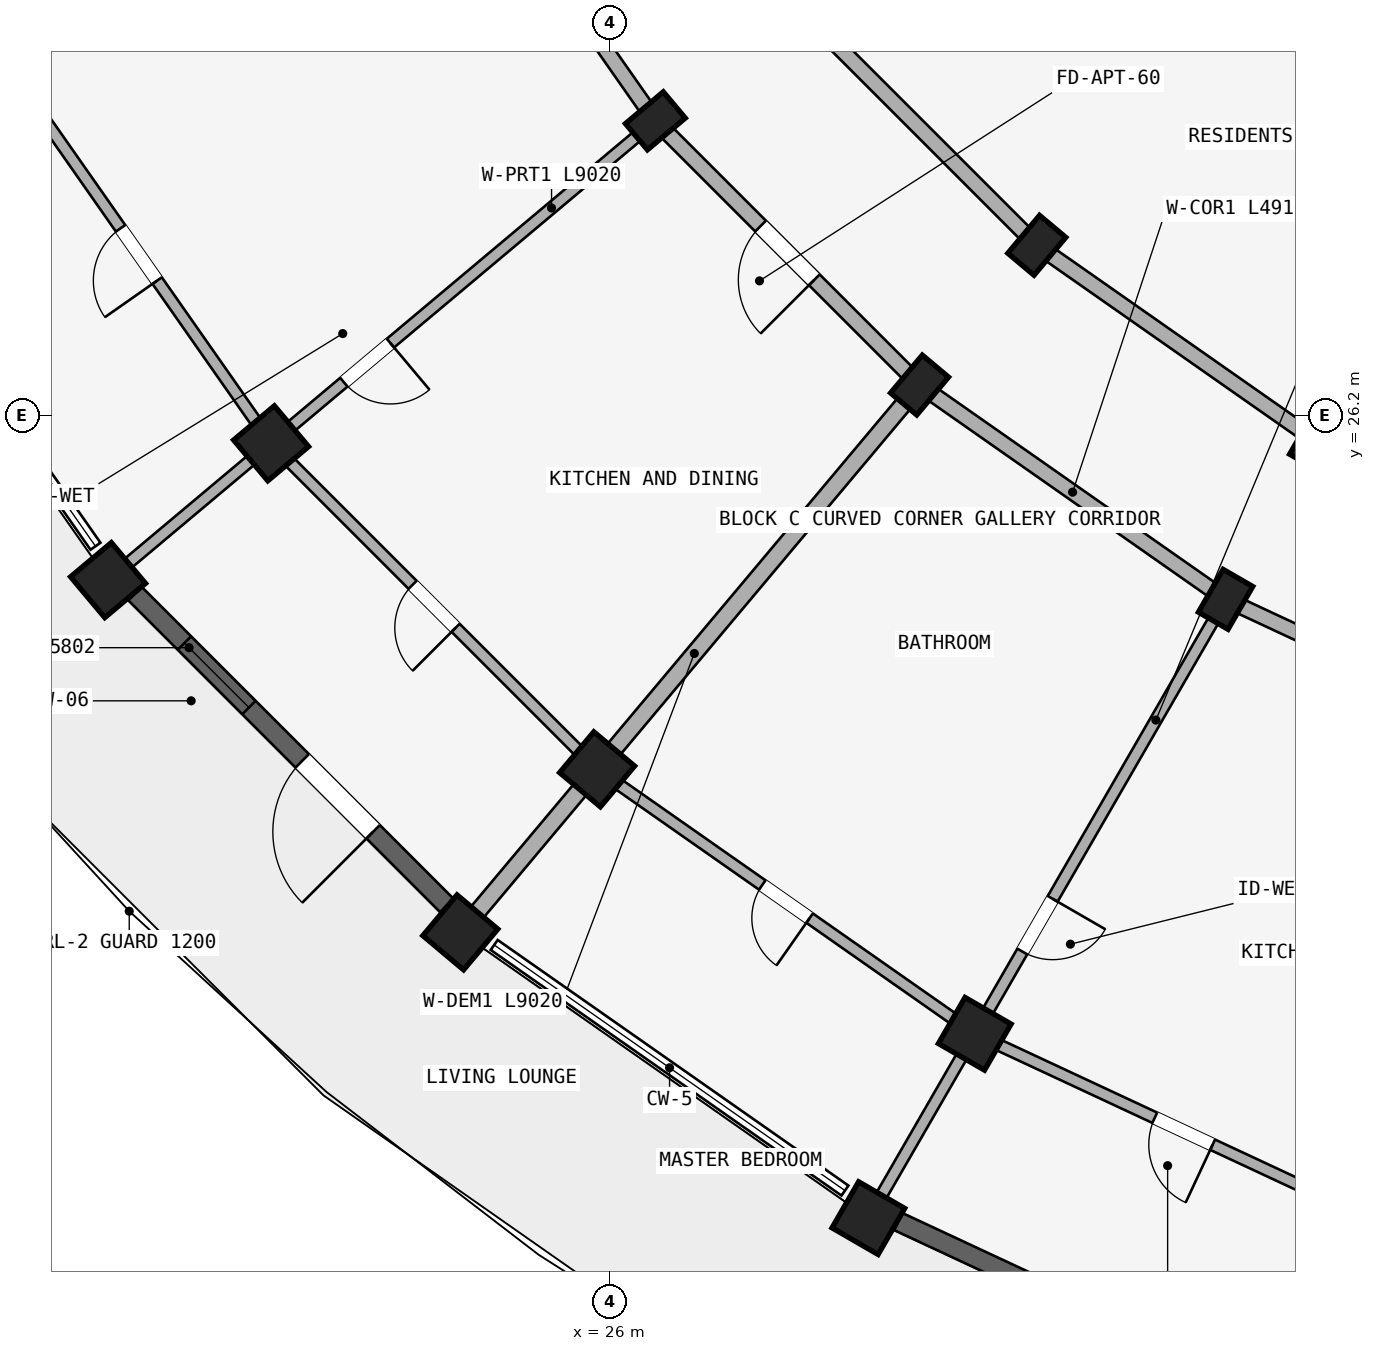
"""IFC4 building model, lengths in metres.
Left out: names, types, materials, properties, quantities, classifications, styles, units other than length and angle.
Written with IfcOpenShell. Run it as: python <this file> out.ifc"""

import sys

from ifc_helpers import new_model, si_unit, direction, frame, frame_2d, origin, origin_2d, place, context, subcontext, project, spatial, rectangle, extrude, element, fill, save


model = new_model("IFC4")
c1 = context("Model", 3, precision=1e-05, world=origin(), true_north=direction((0.0, 1.0)))
c2 = subcontext(c1, "Body", "Model", "MODEL_VIEW")
j1 = project(units=[si_unit("LENGTHUNIT", "METRE"), si_unit("PLANEANGLEUNIT", "RADIAN")], contexts=[c1])
p1 = place(None, origin())
s1 = spatial("IfcSite", under=j1, at=p1, CompositionType="ELEMENT")
p2 = place(p1, origin())
s2 = spatial("IfcBuilding", under=s1, at=p2, CompositionType="ELEMENT")
p3 = place(p2, frame((0.0, 0.0, 27.6)))
s3 = spatial("IfcBuildingStorey", under=s2, at=p3, CompositionType="ELEMENT", Elevation=27.6)
for number, where, z_axis, x_axis in (
    (1, (35.3, 25.856, 0.0), (0.0, 0.0, 1.0), (-0.866, 0.5, 0.0)),
    (2, (34.1, 23.778, 0.0), (0.0, 0.0, 1.0), (-0.866, 0.5, 0.0)),
):
    element("IfcColumn", number, at=place(p3, frame(where, z_axis=z_axis, x_axis=x_axis)), inside=s3, PredefinedType="COLUMN", context=c2, shape_type="SweptSolid", body=[
        extrude(rectangle(XDim=0.45, YDim=0.65, at=origin_2d()), origin(), (0.0, 0.0, 1.0), 2.93),
    ])
p4 = place(p3, frame((30.8, 18.062, 0.0), z_axis=(0.0, 0.0, 1.0), x_axis=(-0.866025403784, 0.5, 0.0)))
e3 = element("IfcColumn", 3, at=p4, inside=s3, PredefinedType="COLUMN", context=c2, shape_type="SweptSolid", body=[
    extrude(rectangle(XDim=0.7, YDim=0.7, at=origin_2d()), origin(), (0.0, 0.0, 1.0), 2.93),
])
p5 = place(p3, frame((29.4, 15.637, 0.0), z_axis=(0.0, 0.0, 1.0), x_axis=(-0.866025403784, 0.5, 0.0)))
e4 = element("IfcColumn", 4, at=p5, inside=s3, PredefinedType="COLUMN", context=c2, shape_type="SweptSolid", body=[
    extrude(rectangle(XDim=0.7, YDim=0.7, at=origin_2d()), origin(), (0.0, 0.0, 1.0), 2.97),
])
for number, where, z_axis, x_axis in (
    (5, (31.616, 28.436, 0.0), (0.0, 0.0, 1.0), (-0.766, 0.643, 0.0)),
    (6, (30.073, 26.598, 0.0), (0.0, 0.0, 1.0), (-0.766, 0.643, 0.0)),
):
    element("IfcColumn", number, at=place(p3, frame(where, z_axis=z_axis, x_axis=x_axis)), inside=s3, PredefinedType="COLUMN", context=c2, shape_type="SweptSolid", body=[
        extrude(rectangle(XDim=0.45, YDim=0.65, at=origin_2d()), origin(), (0.0, 0.0, 1.0), 2.93),
    ])
p6 = place(p3, frame((25.831, 21.542, 0.0), z_axis=(0.0, 0.0, 1.0), x_axis=(-0.766044443119, 0.642787609687, 0.0)))
e7 = element("IfcColumn", 7, at=p6, inside=s3, PredefinedType="COLUMN", context=c2, shape_type="SweptSolid", body=[
    extrude(rectangle(XDim=0.7, YDim=0.7, at=origin_2d()), origin(), (0.0, 0.0, 1.0), 2.93),
])
p7 = place(p3, frame((24.031, 19.397, 0.0), z_axis=(0.0, 0.0, 1.0), x_axis=(-0.766044443119, 0.642787609687, 0.0)))
e8 = element("IfcColumn", 8, at=p7, inside=s3, PredefinedType="COLUMN", context=c2, shape_type="SweptSolid", body=[
    extrude(rectangle(XDim=0.7, YDim=0.7, at=origin_2d()), origin(), (0.0, 0.0, 1.0), 2.97),
])
p8 = place(p3, frame((26.598, 30.073, 0.0), z_axis=(0.0, 0.0, 1.0), x_axis=(-0.642787609687, 0.766044443119, 0.0)))
e9 = element("IfcColumn", 9, at=p8, inside=s3, PredefinedType="COLUMN", context=c2, shape_type="SweptSolid", body=[
    extrude(rectangle(XDim=0.45, YDim=0.65, at=origin_2d()), origin(), (0.0, 0.0, 1.0), 2.93),
])
p9 = place(p3, frame((21.542, 25.831, 0.0), z_axis=(0.0, 0.0, 1.0), x_axis=(-0.642787609687, 0.766044443119, 0.0)))
e10 = element("IfcColumn", 10, at=p9, inside=s3, PredefinedType="COLUMN", context=c2, shape_type="SweptSolid", body=[
    extrude(rectangle(XDim=0.7, YDim=0.7, at=origin_2d()), origin(), (0.0, 0.0, 1.0), 2.93),
])
p10 = place(p3, frame((19.397, 24.031, 0.0), z_axis=(0.0, 0.0, 1.0), x_axis=(-0.642787609687, 0.766044443119, 0.0)))
e11 = element("IfcColumn", 11, at=p10, inside=s3, PredefinedType="COLUMN", context=c2, shape_type="SweptSolid", body=[
    extrude(rectangle(XDim=0.7, YDim=0.7, at=origin_2d()), origin(), (0.0, 0.0, 1.0), 2.97),
])
p11 = place(p3, frame((38.555, 21.701, 0.0), z_axis=(0.0, 0.0, 1.0), x_axis=(-0.906302381024, 0.422629854778, 0.0)))
e12 = element("IfcWall", 12, at=p11, inside=s3, PredefinedType="STANDARD", context=c2, shape_type="SweptSolid", body=[
    extrude(rectangle(XDim=4.915, YDim=0.2, at=frame_2d((2.458, 0.0))), origin(), (0.0, 0.0, 1.0), 2.372),
])
p12 = place(p11, frame((1.888, 0.0, 0.0)))
e13 = element("IfcOpeningElement", 13, at=p12, cuts=e12, PredefinedType="OPENING", context=c2, shape_type="SweptSolid", body=[
    extrude(rectangle(XDim=1.14, YDim=2.15, at=frame_2d((0.57, 1.075))), frame((0.0, 0.11, 0.0), z_axis=(0.0, -1.0, 0.0), x_axis=(1.0, 0.0, 0.0)), (0.0, 0.0, 1.0), 0.22),
])
p13 = place(p3, frame((35.3, 25.856, 0.0), z_axis=(0.0, 0.0, 1.0), x_axis=(-0.819155404658, 0.573571637217, 0.0)))
e14 = element("IfcWall", 14, at=p13, inside=s3, PredefinedType="STANDARD", context=c2, shape_type="SweptSolid", body=[
    extrude(rectangle(XDim=4.497, YDim=0.2, at=frame_2d((2.249, 0.0))), origin(), (0.0, 0.0, 1.0), 2.372),
])
p14 = place(p3, frame((34.1, 23.778, 0.0), z_axis=(0.0, 0.0, 1.0), x_axis=(-0.819140911474, 0.573592335331, 0.0)))
e15 = element("IfcWall", 15, at=p14, inside=s3, PredefinedType="STANDARD", context=c2, shape_type="SweptSolid", body=[
    extrude(rectangle(XDim=4.916, YDim=0.2, at=frame_2d((2.458, 0.0))), origin(), (0.0, 0.0, 1.0), 2.372),
])
p15 = place(p3, frame((31.616, 28.436, 0.0), z_axis=(0.0, 0.0, 1.0), x_axis=(-0.707106781187, 0.707106781187, 0.0)))
e16 = element("IfcWall", 16, at=p15, inside=s3, PredefinedType="STANDARD", context=c2, shape_type="SweptSolid", body=[
    extrude(rectangle(XDim=4.497, YDim=0.2, at=frame_2d((2.249, 0.0))), origin(), (0.0, 0.0, 1.0), 2.372),
])
p16 = place(p3, frame((30.073, 26.598, 0.0), z_axis=(0.0, 0.0, 1.0), x_axis=(-0.707106781187, 0.707106781187, 0.0)))
e17 = element("IfcWall", 17, at=p16, inside=s3, PredefinedType="STANDARD", context=c2, shape_type="SweptSolid", body=[
    extrude(rectangle(XDim=4.916, YDim=0.2, at=frame_2d((2.458, 0.0))), origin(), (0.0, 0.0, 1.0), 2.372),
])
p17 = place(p16, frame((1.958, 0.0, 0.0)))
e18 = element("IfcOpeningElement", 18, at=p17, cuts=e17, PredefinedType="OPENING", context=c2, shape_type="SweptSolid", body=[
    extrude(rectangle(XDim=1.0, YDim=2.15, at=frame_2d((0.5, 1.075))), frame((0.0, 0.11, 0.0), z_axis=(0.0, -1.0, 0.0), x_axis=(1.0, 0.0, 0.0)), (0.0, 0.0, 1.0), 0.22),
])
p18 = place(p3, frame((26.598, 30.073, 0.0), z_axis=(0.0, 0.0, 1.0), x_axis=(-0.573592335331, 0.819140911474, 0.0)))
e19 = element("IfcWall", 19, at=p18, inside=s3, PredefinedType="STANDARD", context=c2, shape_type="SweptSolid", body=[
    extrude(rectangle(XDim=4.916, YDim=0.2, at=frame_2d((2.458, 0.0))), origin(), (0.0, 0.0, 1.0), 2.372),
])
p19 = place(p3, frame((34.05, 23.691, 0.0), z_axis=(0.0, 0.0, 1.0), x_axis=(-0.500002045973, -0.866024222538, 0.0)))
e20 = element("IfcWall", 20, at=p19, inside=s3, PredefinedType="PARTITIONING", context=c2, shape_type="SweptSolid", body=[
    extrude(rectangle(XDim=9.02, YDim=0.15, at=frame_2d((4.51, 0.0))), origin(), (0.0, 0.0, 1.0), 2.372),
])
p20 = place(p19, frame((4.45, 0.0, 0.0)))
e21 = element("IfcOpeningElement", 21, at=p20, cuts=e20, PredefinedType="OPENING", context=c2, shape_type="SweptSolid", body=[
    extrude(rectangle(XDim=0.8, YDim=2.1, at=frame_2d((0.4, 1.05))), frame((0.0, 0.085, 0.0), z_axis=(0.0, -1.0, 0.0), x_axis=(1.0, 0.0, 0.0)), (0.0, 0.0, 1.0), 0.17),
])
p21 = place(p3, frame((30.009, 26.521, 0.0), z_axis=(0.0, 0.0, 1.0), x_axis=(-0.642784468535, -0.766047078847, 0.0)))
e22 = element("IfcWall", 22, at=p21, inside=s3, PredefinedType="STANDARD", context=c2, shape_type="SweptSolid", body=[
    extrude(rectangle(XDim=9.02, YDim=0.22, at=frame_2d((4.51, 0.0))), origin(), (0.0, 0.0, 1.0), 2.372),
])
p22 = place(p3, frame((26.521, 30.009, 0.0), z_axis=(0.0, 0.0, 1.0), x_axis=(-0.766047078847, -0.642784468535, 0.0)))
e23 = element("IfcWall", 23, at=p22, inside=s3, PredefinedType="PARTITIONING", context=c2, shape_type="SweptSolid", body=[
    extrude(rectangle(XDim=9.02, YDim=0.15, at=frame_2d((4.51, 0.0))), origin(), (0.0, 0.0, 1.0), 2.372),
])
p23 = place(p22, frame((4.45, 0.0, 0.0)))
e24 = element("IfcOpeningElement", 24, at=p23, cuts=e23, PredefinedType="OPENING", context=c2, shape_type="SweptSolid", body=[
    extrude(rectangle(XDim=0.8, YDim=2.1, at=frame_2d((0.4, 1.05))), frame((0.0, 0.085, 0.0), z_axis=(0.0, -1.0, 0.0), x_axis=(1.0, 0.0, 0.0)), (0.0, 0.0, 1.0), 0.17),
])
p24 = place(p3, frame((23.691, 34.05, 0.0), z_axis=(0.0, 0.0, 1.0), x_axis=(-0.866024222538, -0.500002045973, 0.0)))
e25 = element("IfcWall", 25, at=p24, inside=s3, PredefinedType="STANDARD", context=c2, shape_type="SweptSolid", body=[
    extrude(rectangle(XDim=9.02, YDim=0.22, at=frame_2d((4.51, 0.0))), origin(), (0.0, 0.0, 1.0), 2.372),
])
p25 = place(p3, frame((36.298, 15.499, 0.0), z_axis=(0.0, 0.0, 1.0), x_axis=(-0.906312656069, 0.42260781991, 0.0)))
e26 = element("IfcWall", 26, at=p25, inside=s3, PredefinedType="PLUMBINGWALL", context=c2, shape_type="SweptSolid", body=[
    extrude(rectangle(XDim=6.066, YDim=0.15, at=frame_2d((3.033, 0.0))), origin(), (0.0, 0.0, 1.0), 2.372),
])
p26 = place(p25, frame((2.613, 0.0, 0.0)))
e27 = element("IfcOpeningElement", 27, at=p26, cuts=e26, PredefinedType="OPENING", context=c2, shape_type="SweptSolid", body=[
    extrude(rectangle(XDim=0.84, YDim=2.1, at=frame_2d((0.42, 1.05))), frame((0.0, 0.085, 0.0), z_axis=(0.0, -1.0, 0.0), x_axis=(1.0, 0.0, 0.0)), (0.0, 0.0, 1.0), 0.17),
])
p27 = place(p3, frame((30.8, 18.062, 0.0), z_axis=(0.0, 0.0, 1.0), x_axis=(-0.81913926159, 0.573594691504, 0.0)))
e28 = element("IfcWall", 28, at=p27, inside=s3, PredefinedType="PLUMBINGWALL", context=c2, shape_type="SweptSolid", body=[
    extrude(rectangle(XDim=6.066, YDim=0.15, at=frame_2d((3.033, 0.0))), origin(), (0.0, 0.0, 1.0), 2.372),
])
p28 = place(p27, frame((2.653, 0.0, 0.0)))
e29 = element("IfcOpeningElement", 29, at=p28, cuts=e28, PredefinedType="OPENING", context=c2, shape_type="SweptSolid", body=[
    extrude(rectangle(XDim=0.76, YDim=2.05, at=frame_2d((0.38, 1.025))), frame((0.0, 0.085, 0.0), z_axis=(0.0, -1.0, 0.0), x_axis=(1.0, 0.0, 0.0)), (0.0, 0.0, 1.0), 0.17),
])
p29 = place(p3, frame((25.831, 21.542, 0.0), z_axis=(0.0, 0.0, 1.0), x_axis=(-0.707106781187, 0.707106781187, 0.0)))
e30 = element("IfcWall", 30, at=p29, inside=s3, PredefinedType="PLUMBINGWALL", context=c2, shape_type="SweptSolid", body=[
    extrude(rectangle(XDim=6.066, YDim=0.15, at=frame_2d((3.033, 0.0))), origin(), (0.0, 0.0, 1.0), 2.372),
])
p30 = place(p29, frame((2.633, 0.0, 0.0)))
e31 = element("IfcOpeningElement", 31, at=p30, cuts=e30, PredefinedType="OPENING", context=c2, shape_type="SweptSolid", body=[
    extrude(rectangle(XDim=0.8, YDim=2.1, at=frame_2d((0.4, 1.05))), frame((0.0, 0.085, 0.0), z_axis=(0.0, -1.0, 0.0), x_axis=(1.0, 0.0, 0.0)), (0.0, 0.0, 1.0), 0.17),
])
p31 = place(p3, frame((21.542, 25.831, 0.0), z_axis=(0.0, 0.0, 1.0), x_axis=(-0.573594691504, 0.81913926159, 0.0)))
e32 = element("IfcWall", 32, at=p31, inside=s3, PredefinedType="PLUMBINGWALL", context=c2, shape_type="SweptSolid", body=[
    extrude(rectangle(XDim=6.066, YDim=0.15, at=frame_2d((3.033, 0.0))), origin(), (0.0, 0.0, 1.0), 2.372),
])
p32 = place(p31, frame((2.613, 0.0, 0.0)))
e33 = element("IfcOpeningElement", 33, at=p32, cuts=e32, PredefinedType="OPENING", context=c2, shape_type="SweptSolid", body=[
    extrude(rectangle(XDim=0.84, YDim=2.1, at=frame_2d((0.42, 1.05))), frame((0.0, 0.085, 0.0), z_axis=(0.0, -1.0, 0.0), x_axis=(1.0, 0.0, 0.0)), (0.0, 0.0, 1.0), 0.17),
])
p33 = place(p3, frame((35.052, 13.14, 0.0), z_axis=(0.0, 0.0, 1.0), x_axis=(-0.906312089251, 0.422609035489, 0.0)))
e34 = element("IfcWall", 34, at=p33, inside=s3, PredefinedType="STANDARD", context=c2, shape_type="SweptSolid", body=[
    extrude(rectangle(XDim=5.802, YDim=0.25, at=frame_2d((2.901, 0.0))), origin(), (0.0, 0.0, 1.0), 2.48),
])
p34 = place(p33, frame((1.951, 0.0, 0.53)))
e35 = element("IfcOpeningElement", 35, at=p34, cuts=e34, PredefinedType="OPENING", context=c2, shape_type="SweptSolid", body=[
    extrude(rectangle(XDim=1.9, YDim=1.75, at=frame_2d((0.95, 0.875))), frame((0.0, 0.135, 0.0), z_axis=(0.0, -1.0, 0.0), x_axis=(1.0, 0.0, 0.0)), (0.0, 0.0, 1.0), 0.27),
])
p35 = place(p3, frame((23.854, 19.751, 0.0), z_axis=(0.0, 0.0, 1.0), x_axis=(-0.707106781187, 0.707106781187, 0.0)))
e36 = element("IfcWall", 36, at=p35, inside=s3, PredefinedType="STANDARD", context=c2, shape_type="SweptSolid", body=[
    extrude(rectangle(XDim=5.802, YDim=0.25, at=frame_2d((2.901, 0.0))), origin(), (0.0, 0.0, 1.0), 2.48),
])
p36 = place(p35, frame((3.682, 0.0, 0.38)))
e37 = element("IfcOpeningElement", 37, at=p36, cuts=e36, PredefinedType="OPENING", context=c2, shape_type="SweptSolid", body=[
    extrude(rectangle(XDim=1.2, YDim=1.5, at=frame_2d((0.6, 0.75))), frame((0.0, 0.135, 0.0), z_axis=(0.0, -1.0, 0.0), x_axis=(1.0, 0.0, 0.0)), (0.0, 0.0, 1.0), 0.27),
])
p37 = place(p35, frame((1.371, 0.0, 0.0)))
e38 = element("IfcOpeningElement", 38, at=p37, cuts=e36, PredefinedType="OPENING", context=c2, shape_type="SweptSolid", body=[
    extrude(rectangle(XDim=1.32, YDim=2.15, at=frame_2d((0.66, 1.075))), frame((0.0, 0.135, 0.0), z_axis=(0.0, -1.0, 0.0), x_axis=(1.0, 0.0, 0.0)), (0.0, 0.0, 1.0), 0.27),
])
p38 = place(p36, origin())
e39 = element("IfcWindow", 39, at=p38, inside=s3, PartitioningType="SINGLE_PANEL", PredefinedType="WINDOW", context=c2, shape_type="SweptSolid", body=[
    extrude(rectangle(XDim=1.2, YDim=1.5, at=frame_2d((0.6, 0.75))), frame((0.0, 0.03, 0.0), z_axis=(0.0, -1.0, 0.0), x_axis=(1.0, 0.0, 0.0)), (0.0, 0.0, 1.0), 0.06),
])
fill(e37, e39)
p39 = place(p20, frame((0.8, 0.0, 0.0), z_axis=(0.0, 0.0, 1.0), x_axis=(-1.0, 0.0, 0.0)))
e40 = element("IfcDoor", 40, at=p39, inside=s3, OperationType="SINGLE_SWING_RIGHT", PredefinedType="DOOR", context=c2, shape_type="SweptSolid", body=[
    extrude(rectangle(XDim=0.8, YDim=2.1, at=frame_2d((0.4, 1.05))), frame((0.0, 0.025, 0.0), z_axis=(0.0, -1.0, 0.0), x_axis=(1.0, 0.0, 0.0)), (0.0, 0.0, 1.0), 0.05),
])
fill(e21, e40)
p40 = place(p23, origin())
e41 = element("IfcDoor", 41, at=p40, inside=s3, OperationType="SINGLE_SWING_LEFT", PredefinedType="DOOR", context=c2, shape_type="SweptSolid", body=[
    extrude(rectangle(XDim=0.8, YDim=2.1, at=frame_2d((0.4, 1.05))), frame((0.0, 0.025, 0.0), z_axis=(0.0, -1.0, 0.0), x_axis=(1.0, 0.0, 0.0)), (0.0, 0.0, 1.0), 0.05),
])
fill(e24, e41)
p41 = place(p26, frame((0.84, 0.0, 0.0), z_axis=(0.0, 0.0, 1.0), x_axis=(-1.0, 0.0, 0.0)))
e42 = element("IfcDoor", 42, at=p41, inside=s3, OperationType="SINGLE_SWING_RIGHT", PredefinedType="DOOR", context=c2, shape_type="SweptSolid", body=[
    extrude(rectangle(XDim=0.84, YDim=2.1, at=frame_2d((0.42, 1.05))), frame((0.0, 0.025, 0.0), z_axis=(0.0, -1.0, 0.0), x_axis=(1.0, 0.0, 0.0)), (0.0, 0.0, 1.0), 0.05),
])
fill(e27, e42)
p42 = place(p28, origin())
e43 = element("IfcDoor", 43, at=p42, inside=s3, OperationType="SINGLE_SWING_LEFT", PredefinedType="DOOR", context=c2, shape_type="SweptSolid", body=[
    extrude(rectangle(XDim=0.76, YDim=2.05, at=frame_2d((0.38, 1.025))), frame((0.0, 0.025, 0.0), z_axis=(0.0, -1.0, 0.0), x_axis=(1.0, 0.0, 0.0)), (0.0, 0.0, 1.0), 0.05),
])
fill(e29, e43)
p43 = place(p17, frame((1.0, 0.0, 0.0), z_axis=(0.0, 0.0, 1.0), x_axis=(-1.0, 0.0, 0.0)))
e44 = element("IfcDoor", 44, at=p43, inside=s3, OperationType="SINGLE_SWING_RIGHT", PredefinedType="DOOR", context=c2, shape_type="SweptSolid", body=[
    extrude(rectangle(XDim=1.0, YDim=2.15, at=frame_2d((0.5, 1.075))), frame((0.0, 0.025, 0.0), z_axis=(0.0, -1.0, 0.0), x_axis=(1.0, 0.0, 0.0)), (0.0, 0.0, 1.0), 0.05),
])
fill(e18, e44)
p44 = place(p30, origin())
e45 = element("IfcDoor", 45, at=p44, inside=s3, OperationType="SINGLE_SWING_LEFT", PredefinedType="DOOR", context=c2, shape_type="SweptSolid", body=[
    extrude(rectangle(XDim=0.8, YDim=2.1, at=frame_2d((0.4, 1.05))), frame((0.0, 0.025, 0.0), z_axis=(0.0, -1.0, 0.0), x_axis=(1.0, 0.0, 0.0)), (0.0, 0.0, 1.0), 0.05),
])
fill(e31, e45)
p45 = place(p32, frame((0.84, 0.0, 0.0), z_axis=(0.0, 0.0, 1.0), x_axis=(-1.0, 0.0, 0.0)))
e46 = element("IfcDoor", 46, at=p45, inside=s3, OperationType="SINGLE_SWING_RIGHT", PredefinedType="DOOR", context=c2, shape_type="SweptSolid", body=[
    extrude(rectangle(XDim=0.84, YDim=2.1, at=frame_2d((0.42, 1.05))), frame((0.0, 0.025, 0.0), z_axis=(0.0, -1.0, 0.0), x_axis=(1.0, 0.0, 0.0)), (0.0, 0.0, 1.0), 0.05),
])
fill(e33, e46)
p46 = place(p37, origin())
e47 = element("IfcDoor", 47, at=p46, inside=s3, OperationType="SINGLE_SWING_LEFT", PredefinedType="DOOR", context=c2, shape_type="SweptSolid", body=[
    extrude(rectangle(XDim=1.32, YDim=2.15, at=frame_2d((0.66, 1.075))), frame((0.0, 0.025, 0.0), z_axis=(0.0, -1.0, 0.0), x_axis=(1.0, 0.0, 0.0)), (0.0, 0.0, 1.0), 0.05),
])
fill(e38, e47)
save(model, sys.argv[1])
